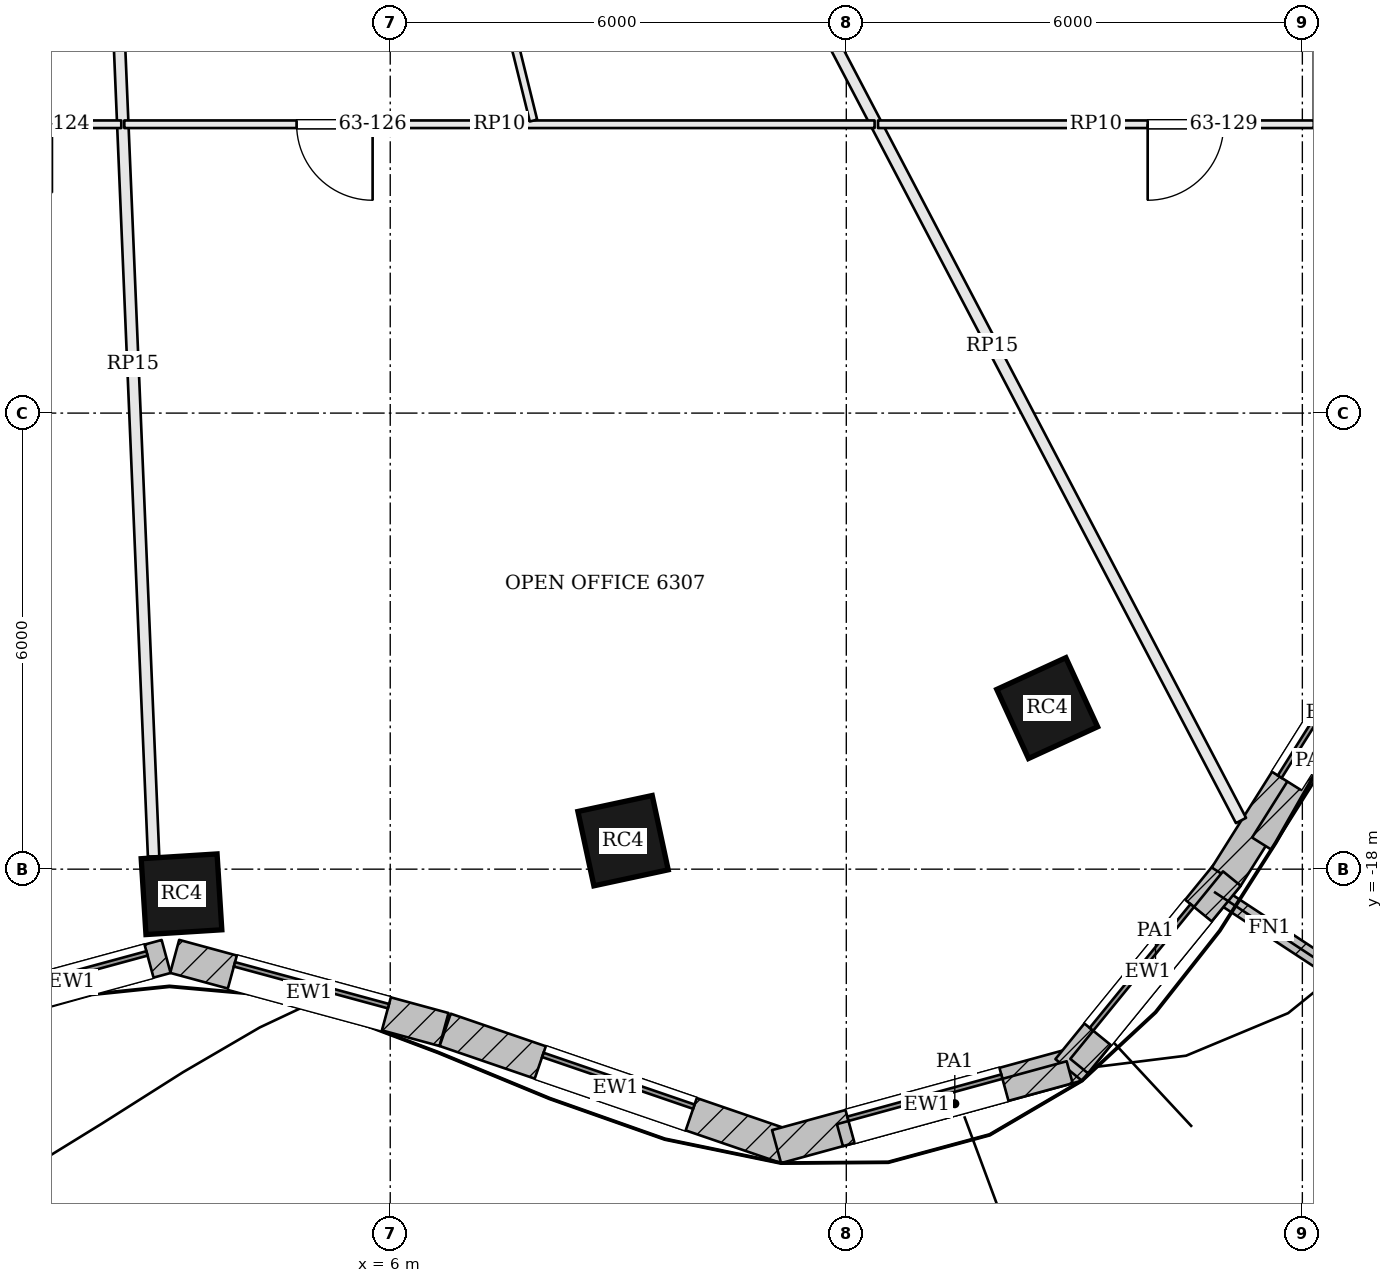
"""IFC4 building model, lengths in metres.
Left out: names, types, materials, properties, quantities, classifications, styles, units other than length and angle.
Written with IfcOpenShell. Run it as: python <this file> out.ifc"""

import sys

from ifc_helpers import new_model, si_unit, direction, frame, frame_2d, origin, origin_2d, place, context, subcontext, project, spatial, rectangle, extrude, element, fill, save


model = new_model("IFC4")
c1 = context("Model", 3, precision=1e-05, world=origin(), true_north=direction((0.0, 1.0)))
c2 = subcontext(c1, "Body", "Model", "MODEL_VIEW")
j1 = project(units=[si_unit("LENGTHUNIT", "METRE"), si_unit("PLANEANGLEUNIT", "RADIAN")], contexts=[c1])
p1 = place(None, origin())
s1 = spatial("IfcSite", under=j1, at=p1, CompositionType="ELEMENT")
p2 = place(p1, origin())
s2 = spatial("IfcBuilding", under=s1, at=p2, CompositionType="ELEMENT")
p3 = place(p2, frame((0.0, 0.0, 256.5)))
s3 = spatial("IfcBuildingStorey", under=s2, at=p3, CompositionType="ELEMENT", Elevation=256.5)
for number, where, z_axis, x_axis in (
    (1, (3.254, -18.33, 0.0), (0.0, 0.0, 1.0), (0.998, 0.063, 0.0)),
    (2, (9.063, -17.625, 0.0), (0.0, 0.0, 1.0), (0.978, 0.21, 0.0)),
    (3, (14.643, -15.881, 0.0), (0.0, 0.0, 1.0), (0.909, 0.417, 0.0)),
):
    element("IfcColumn", number, at=place(p3, frame(where, z_axis=z_axis, x_axis=x_axis)), inside=s3, PredefinedType="COLUMN", context=c2, shape_type="SweptSolid", body=[
        extrude(rectangle(XDim=1.0, YDim=1.0, at=origin_2d()), origin(), (0.0, 0.0, 1.0), 3.9),
    ])
p4 = place(p3, frame((0.576, -19.821, 0.0), z_axis=(0.0, 0.0, 1.0), x_axis=(0.965009398019, 0.262215296532, 0.0)))
e4 = element("IfcWall", 4, at=p4, inside=s3, PredefinedType="SOLIDWALL", context=c2, shape_type="SweptSolid", body=[
    extrude(rectangle(XDim=2.565, YDim=0.45, at=frame_2d((1.283, 0.0))), origin(), (0.0, 0.0, 1.0), 3.7),
])
p5 = place(p4, frame((0.233, 0.0, 0.9)))
e5 = element("IfcOpeningElement", 5, at=p5, cuts=e4, PredefinedType="OPENING", context=c2, shape_type="SweptSolid", body=[
    extrude(rectangle(XDim=2.1, YDim=2.3, at=frame_2d((1.05, 1.15))), frame((0.0, 0.235, 0.0), z_axis=(0.0, -1.0, 0.0), x_axis=(1.0, 0.0, 0.0)), (0.0, 0.0, 1.0), 0.47),
])
p6 = place(p3, frame((3.164, -19.147, 0.0), z_axis=(0.0, 0.0, 1.0), x_axis=(0.965039479998, -0.262104563191, 0.0)))
e6 = element("IfcWall", 6, at=p6, inside=s3, PredefinedType="SOLIDWALL", context=c2, shape_type="SweptSolid", body=[
    extrude(rectangle(XDim=3.672, YDim=0.45, at=frame_2d((1.836, 0.0))), origin(), (0.0, 0.0, 1.0), 3.7),
])
p7 = place(p6, frame((0.786, 0.0, 0.9)))
e7 = element("IfcOpeningElement", 7, at=p7, cuts=e6, PredefinedType="OPENING", context=c2, shape_type="SweptSolid", body=[
    extrude(rectangle(XDim=2.1, YDim=2.3, at=frame_2d((1.05, 1.15))), frame((0.0, 0.235, 0.0), z_axis=(0.0, -1.0, 0.0), x_axis=(1.0, 0.0, 0.0)), (0.0, 0.0, 1.0), 0.47),
])
p8 = place(p3, frame((6.723, -20.114, 0.0), z_axis=(0.0, 0.0, 1.0), x_axis=(0.945947299026, -0.324320377815, 0.0)))
e8 = element("IfcWall", 8, at=p8, inside=s3, PredefinedType="SOLIDWALL", context=c2, shape_type="SweptSolid", body=[
    extrude(rectangle(XDim=4.745, YDim=0.45, at=frame_2d((2.372, 0.0))), origin(), (0.0, 0.0, 1.0), 3.7),
])
p9 = place(p8, frame((1.322, 0.0, 0.9)))
e9 = element("IfcOpeningElement", 9, at=p9, cuts=e8, PredefinedType="OPENING", context=c2, shape_type="SweptSolid", body=[
    extrude(rectangle(XDim=2.1, YDim=2.3, at=frame_2d((1.05, 1.15))), frame((0.0, 0.235, 0.0), z_axis=(0.0, -1.0, 0.0), x_axis=(1.0, 0.0, 0.0)), (0.0, 0.0, 1.0), 0.47),
])
p10 = place(p3, frame((11.083, -21.65, 0.0), z_axis=(0.0, 0.0, 1.0), x_axis=(0.964483204983, 0.264144179011, 0.0)))
e10 = element("IfcWall", 10, at=p10, inside=s3, PredefinedType="SOLIDWALL", context=c2, shape_type="SweptSolid", body=[
    extrude(rectangle(XDim=4.104, YDim=0.45, at=frame_2d((2.052, 0.0))), origin(), (0.0, 0.0, 1.0), 3.7),
])
p11 = place(p10, frame((1.002, 0.0, 0.9)))
e11 = element("IfcOpeningElement", 11, at=p11, cuts=e10, PredefinedType="OPENING", context=c2, shape_type="SweptSolid", body=[
    extrude(rectangle(XDim=2.1, YDim=2.3, at=frame_2d((1.05, 1.15))), frame((0.0, 0.235, 0.0), z_axis=(0.0, -1.0, 0.0), x_axis=(1.0, 0.0, 0.0)), (0.0, 0.0, 1.0), 0.47),
])
p12 = place(p3, frame((14.926, -20.641, 0.0), z_axis=(0.0, 0.0, 1.0), x_axis=(0.631548074669, 0.775336720001, 0.0)))
e12 = element("IfcWall", 12, at=p12, inside=s3, PredefinedType="SOLIDWALL", context=c2, shape_type="SweptSolid", body=[
    extrude(rectangle(XDim=3.308, YDim=0.45, at=frame_2d((1.654, 0.0))), origin(), (0.0, 0.0, 1.0), 3.7),
])
p13 = place(p12, frame((0.604, 0.0, 0.9)))
e13 = element("IfcOpeningElement", 13, at=p13, cuts=e12, PredefinedType="OPENING", context=c2, shape_type="SweptSolid", body=[
    extrude(rectangle(XDim=2.1, YDim=2.3, at=frame_2d((1.05, 1.15))), frame((0.0, 0.235, 0.0), z_axis=(0.0, -1.0, 0.0), x_axis=(1.0, 0.0, 0.0)), (0.0, 0.0, 1.0), 0.47),
])
p14 = place(p3, frame((16.998, -18.099, 0.0), z_axis=(0.0, 0.0, 1.0), x_axis=(0.532745661304, 0.846275404559, 0.0)))
e14 = element("IfcWall", 14, at=p14, inside=s3, PredefinedType="SOLIDWALL", context=c2, shape_type="SweptSolid", body=[
    extrude(rectangle(XDim=5.076, YDim=0.45, at=frame_2d((2.538, 0.0))), origin(), (0.0, 0.0, 1.0), 3.7),
])
p15 = place(p14, frame((1.488, 0.0, 0.9)))
e15 = element("IfcOpeningElement", 15, at=p15, cuts=e14, PredefinedType="OPENING", context=c2, shape_type="SweptSolid", body=[
    extrude(rectangle(XDim=2.1, YDim=2.3, at=frame_2d((1.05, 1.15))), frame((0.0, 0.235, 0.0), z_axis=(0.0, -1.0, 0.0), x_axis=(1.0, 0.0, 0.0)), (0.0, 0.0, 1.0), 0.47),
])
p16 = place(p3, frame((16.838, -18.298, 0.0), z_axis=(0.0, 0.0, 1.0), x_axis=(0.835871900419, -0.548924554097, 0.0)))
e16 = element("IfcWall", 16, at=p16, inside=s3, PredefinedType="SOLIDWALL", context=c2, shape_type="SweptSolid", body=[
    extrude(rectangle(XDim=1.75, YDim=0.2, at=frame_2d((0.875, 0.0))), origin(), (0.0, 0.0, 1.0), 3.7),
])
p17 = place(p3, frame((11.916, -21.5, 3.9), z_axis=(0.0, 0.0, 1.0), x_axis=(0.964473787466, 0.264178563271, 0.0)))
e17 = element("IfcWall", 17, at=p17, inside=s3, PredefinedType="PARAPET", context=c2, shape_type="SweptSolid", body=[
    extrude(rectangle(XDim=3.134, YDim=0.3, at=frame_2d((1.567, 0.0))), origin(), (0.0, 0.0, 1.0), 1.1),
])
p18 = place(p3, frame((15.063, -20.591, 3.9), z_axis=(0.0, 0.0, 1.0), x_axis=(0.631539712948, 0.775343530939, 0.0)))
e18 = element("IfcWall", 18, at=p18, inside=s3, PredefinedType="PARAPET", context=c2, shape_type="SweptSolid", body=[
    extrude(rectangle(XDim=3.182, YDim=0.3, at=frame_2d((1.591, 0.0))), origin(), (0.0, 0.0, 1.0), 1.1),
])
p19 = place(p3, frame((17.466, -17.664, 3.9), z_axis=(0.0, 0.0, 1.0), x_axis=(0.532743008157, 0.846277074758, 0.0)))
e19 = element("IfcWall", 19, at=p19, inside=s3, PredefinedType="PARAPET", context=c2, shape_type="SweptSolid", body=[
    extrude(rectangle(XDim=2.581, YDim=0.3, at=frame_2d((1.29, 0.0))), origin(), (0.0, 0.0, 1.0), 1.1),
])
p20 = place(p3, frame((2.887, -17.832, 0.0), z_axis=(0.0, 0.0, 1.0), x_axis=(-0.042037723884, 0.999116024179, 0.0)))
e20 = element("IfcWall", 20, at=p20, inside=s3, PredefinedType="PARTITIONING", context=c2, shape_type="SweptSolid", body=[
    extrude(rectangle(XDim=12.969, YDim=0.15, at=frame_2d((6.484, 0.0))), origin(), (0.0, 0.0, 1.0), 3.084),
])
p21 = place(p3, frame((17.193, -17.36, 0.0), z_axis=(0.0, 0.0, 1.0), x_axis=(-0.464008288338, 0.885830857643, 0.0)))
e21 = element("IfcWall", 21, at=p21, inside=s3, PredefinedType="PARTITIONING", context=c2, shape_type="SweptSolid", body=[
    extrude(rectangle(XDim=14.104, YDim=0.15, at=frame_2d((7.052, 0.0))), origin(), (0.0, 0.0, 1.0), 3.084),
])
p22 = place(p3, frame((2.461, -8.2, 0.0), z_axis=(0.0, 0.0, 1.0), x_axis=(-1.0, 0.0, 0.0)))
e22 = element("IfcWall", 22, at=p22, inside=s3, PredefinedType="PARTITIONING", context=c2, shape_type="SweptSolid", body=[
    extrude(rectangle(XDim=10.07, YDim=0.1, at=frame_2d((5.035, 0.0))), origin(), (0.0, 0.0, 1.0), 3.084),
])
p23 = place(p22, frame((7.315, 0.0, 0.0)))
e23 = element("IfcOpeningElement", 23, at=p23, cuts=e22, PredefinedType="OPENING", context=c2, shape_type="SweptSolid", body=[
    extrude(rectangle(XDim=1.0, YDim=2.1, at=frame_2d((0.5, 1.05))), frame((0.0, 0.06, 0.0), z_axis=(0.0, -1.0, 0.0), x_axis=(1.0, 0.0, 0.0)), (0.0, 0.0, 1.0), 0.12),
])
p24 = place(p22, frame((0.912, 0.0, 0.0)))
e24 = element("IfcOpeningElement", 24, at=p24, cuts=e22, PredefinedType="OPENING", context=c2, shape_type="SweptSolid", body=[
    extrude(rectangle(XDim=0.9, YDim=2.1, at=frame_2d((0.45, 1.05))), frame((0.0, 0.06, 0.0), z_axis=(0.0, -1.0, 0.0), x_axis=(1.0, 0.0, 0.0)), (0.0, 0.0, 1.0), 0.12),
])
p25 = place(p3, frame((12.372, -8.2, 0.0), z_axis=(0.0, 0.0, 1.0), x_axis=(-1.0, 0.0, 0.0)))
e25 = element("IfcWall", 25, at=p25, inside=s3, PredefinedType="PARTITIONING", context=c2, shape_type="SweptSolid", body=[
    extrude(rectangle(XDim=9.871, YDim=0.1, at=frame_2d((4.936, 0.0))), origin(), (0.0, 0.0, 1.0), 3.084),
])
p26 = place(p25, frame((6.604, 0.0, 0.0)))
e26 = element("IfcOpeningElement", 26, at=p26, cuts=e25, PredefinedType="OPENING", context=c2, shape_type="SweptSolid", body=[
    extrude(rectangle(XDim=1.0, YDim=2.1, at=frame_2d((0.5, 1.05))), frame((0.0, 0.06, 0.0), z_axis=(0.0, -1.0, 0.0), x_axis=(1.0, 0.0, 0.0)), (0.0, 0.0, 1.0), 0.12),
])
p27 = place(p3, frame((7.075, -4.873, 0.0), z_axis=(0.0, 0.0, 1.0), x_axis=(0.239779199404, -0.970827448898, 0.0)))
e27 = element("IfcWall", 27, at=p27, inside=s3, PredefinedType="PARTITIONING", context=c2, shape_type="SweptSolid", body=[
    extrude(rectangle(XDim=3.377, YDim=0.1, at=frame_2d((1.689, 0.0))), origin(), (0.0, 0.0, 1.0), 3.084),
])
p28 = place(p3, frame((18.15, -8.2, 0.0), z_axis=(0.0, 0.0, 1.0), x_axis=(-1.0, 0.0, 0.0)))
e28 = element("IfcWall", 28, at=p28, inside=s3, PredefinedType="PARTITIONING", context=c2, shape_type="SweptSolid", body=[
    extrude(rectangle(XDim=5.732, YDim=0.1, at=frame_2d((2.866, 0.0))), origin(), (0.0, 0.0, 1.0), 3.084),
])
p29 = place(p28, frame((1.185, 0.0, 0.0)))
e29 = element("IfcOpeningElement", 29, at=p29, cuts=e28, PredefinedType="OPENING", context=c2, shape_type="SweptSolid", body=[
    extrude(rectangle(XDim=1.0, YDim=2.1, at=frame_2d((0.5, 1.05))), frame((0.0, 0.06, 0.0), z_axis=(0.0, -1.0, 0.0), x_axis=(1.0, 0.0, 0.0)), (0.0, 0.0, 1.0), 0.12),
])
p30 = place(p5, origin())
e30 = element("IfcWindow", 30, at=p30, inside=s3, PartitioningType="SINGLE_PANEL", PredefinedType="WINDOW", context=c2, shape_type="SweptSolid", body=[
    extrude(rectangle(XDim=2.1, YDim=2.3, at=frame_2d((1.05, 1.15))), frame((0.0, 0.135, 0.0), z_axis=(0.0, -1.0, 0.0), x_axis=(1.0, 0.0, 0.0)), (0.0, 0.0, 1.0), 0.06),
])
fill(e5, e30)
p31 = place(p7, origin())
e31 = element("IfcWindow", 31, at=p31, inside=s3, PartitioningType="SINGLE_PANEL", PredefinedType="WINDOW", context=c2, shape_type="SweptSolid", body=[
    extrude(rectangle(XDim=2.1, YDim=2.3, at=frame_2d((1.05, 1.15))), frame((0.0, 0.135, 0.0), z_axis=(0.0, -1.0, 0.0), x_axis=(1.0, 0.0, 0.0)), (0.0, 0.0, 1.0), 0.06),
])
fill(e7, e31)
p32 = place(p9, origin())
e32 = element("IfcWindow", 32, at=p32, inside=s3, PartitioningType="SINGLE_PANEL", PredefinedType="WINDOW", context=c2, shape_type="SweptSolid", body=[
    extrude(rectangle(XDim=2.1, YDim=2.3, at=frame_2d((1.05, 1.15))), frame((0.0, 0.135, 0.0), z_axis=(0.0, -1.0, 0.0), x_axis=(1.0, 0.0, 0.0)), (0.0, 0.0, 1.0), 0.06),
])
fill(e9, e32)
p33 = place(p11, origin())
e33 = element("IfcWindow", 33, at=p33, inside=s3, PartitioningType="SINGLE_PANEL", PredefinedType="WINDOW", context=c2, shape_type="SweptSolid", body=[
    extrude(rectangle(XDim=2.1, YDim=2.3, at=frame_2d((1.05, 1.15))), frame((0.0, 0.135, 0.0), z_axis=(0.0, -1.0, 0.0), x_axis=(1.0, 0.0, 0.0)), (0.0, 0.0, 1.0), 0.06),
])
fill(e11, e33)
p34 = place(p13, origin())
e34 = element("IfcWindow", 34, at=p34, inside=s3, PartitioningType="SINGLE_PANEL", PredefinedType="WINDOW", context=c2, shape_type="SweptSolid", body=[
    extrude(rectangle(XDim=2.1, YDim=2.3, at=frame_2d((1.05, 1.15))), frame((0.0, 0.135, 0.0), z_axis=(0.0, -1.0, 0.0), x_axis=(1.0, 0.0, 0.0)), (0.0, 0.0, 1.0), 0.06),
])
fill(e13, e34)
p35 = place(p15, origin())
e35 = element("IfcWindow", 35, at=p35, inside=s3, PartitioningType="SINGLE_PANEL", PredefinedType="WINDOW", context=c2, shape_type="SweptSolid", body=[
    extrude(rectangle(XDim=2.1, YDim=2.3, at=frame_2d((1.05, 1.15))), frame((0.0, 0.135, 0.0), z_axis=(0.0, -1.0, 0.0), x_axis=(1.0, 0.0, 0.0)), (0.0, 0.0, 1.0), 0.06),
])
fill(e15, e35)
p36 = place(p26, origin())
e36 = element("IfcDoor", 36, at=p36, inside=s3, OperationType="SINGLE_SWING_LEFT", PredefinedType="DOOR", context=c2, shape_type="SweptSolid", body=[
    extrude(rectangle(XDim=1.0, YDim=2.1, at=frame_2d((0.5, 1.05))), frame((0.0, 0.025, 0.0), z_axis=(0.0, -1.0, 0.0), x_axis=(1.0, 0.0, 0.0)), (0.0, 0.0, 1.0), 0.05),
])
fill(e26, e36)
p37 = place(p29, origin())
e37 = element("IfcDoor", 37, at=p37, inside=s3, OperationType="SINGLE_SWING_RIGHT", PredefinedType="DOOR", context=c2, shape_type="SweptSolid", body=[
    extrude(rectangle(XDim=1.0, YDim=2.1, at=frame_2d((0.5, 1.05))), frame((0.0, 0.025, 0.0), z_axis=(0.0, -1.0, 0.0), x_axis=(1.0, 0.0, 0.0)), (0.0, 0.0, 1.0), 0.05),
])
fill(e29, e37)
save(model, sys.argv[1])
